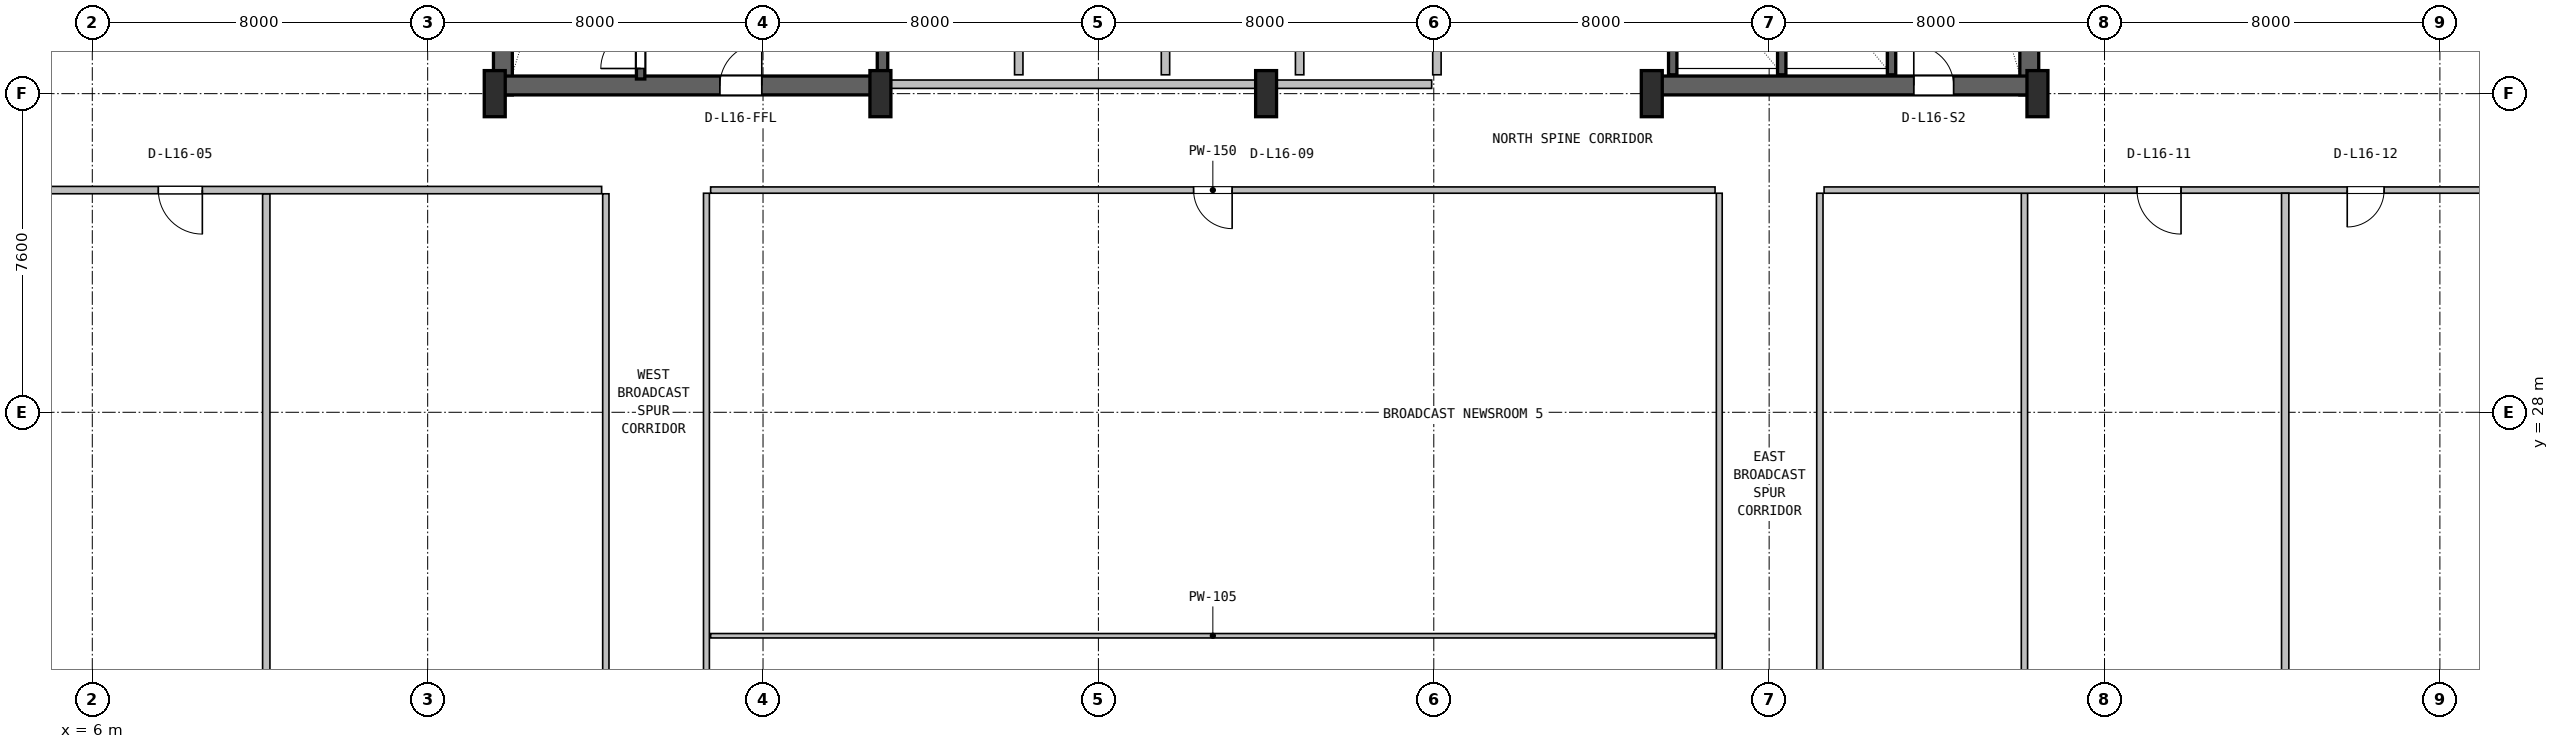
"""IFC4 building model, lengths in metres.
Left out: names, types, materials, properties, quantities, classifications, styles, units other than length and angle.
Written with IfcOpenShell. Run it as: python <this file> out.ifc"""

import sys

from ifc_helpers import new_model, si_unit, direction, frame, frame_2d, origin, origin_2d, place, context, subcontext, project, spatial, rectangle, i_section, extrude, source, transform, mapped, element, fill, save


model = new_model("IFC4")
c1 = context("Model", 3, precision=1e-05, world=origin(), true_north=direction((0.0, 1.0)))
c2 = subcontext(c1, "Body", "Model", "MODEL_VIEW")
j1 = project(units=[si_unit("LENGTHUNIT", "METRE"), si_unit("PLANEANGLEUNIT", "RADIAN")], contexts=[c1])
p1 = place(None, origin())
s1 = spatial("IfcSite", under=j1, at=p1, CompositionType="ELEMENT")
p2 = place(p1, origin())
s2 = spatial("IfcBuilding", under=s1, at=p2, CompositionType="ELEMENT")
p3 = place(p2, frame((0.0, 0.0, 70.5)))
s3 = spatial("IfcBuildingStorey", under=s2, at=p3, CompositionType="ELEMENT", Elevation=70.5)
for number, where, z_axis, x_axis in (
    (1, (15.795, 35.57, 0.0), (0.0, 0.0, 1.0), (0.0, 1.0, 0.0)),
    (2, (52.205, 35.57, 0.0), (0.0, 0.0, 1.0), (0.0, 1.0, 0.0)),
):
    element("IfcWall", number, at=place(p3, frame(where, z_axis=z_axis, x_axis=x_axis)), inside=s3, PredefinedType="SHEAR", context=c2, shape_type="SweptSolid", body=[
        extrude(rectangle(XDim=11.23, YDim=0.45, at=frame_2d((5.615, 0.0))), origin(), (0.0, 0.0, 1.0), 3.65),
    ])
p4 = place(p3, frame((15.57, 35.795, 0.0), z_axis=(0.0, 0.0, 1.0), x_axis=(1.0, 0.0, 0.0)))
e3 = element("IfcWall", 3, at=p4, inside=s3, PredefinedType="SHEAR", context=c2, shape_type="SweptSolid", body=[
    extrude(rectangle(XDim=9.23, YDim=0.45, at=frame_2d((4.615, 0.0))), origin(), (0.0, 0.0, 1.0), 3.65),
])
p5 = place(p4, frame((5.4, 0.0, 0.0)))
e4 = element("IfcOpeningElement", 4, at=p5, cuts=e3, PredefinedType="OPENING", context=c2, shape_type="SweptSolid", body=[
    extrude(rectangle(XDim=1.0, YDim=2.1, at=frame_2d((0.5, 1.05))), frame((0.0, 0.235, 0.0), z_axis=(0.0, -1.0, 0.0), x_axis=(1.0, 0.0, 0.0)), (0.0, 0.0, 1.0), 0.47),
])
p6 = place(p3, frame((43.2, 35.795, 0.0), z_axis=(0.0, 0.0, 1.0), x_axis=(1.0, 0.0, 0.0)))
e5 = element("IfcWall", 5, at=p6, inside=s3, PredefinedType="SHEAR", context=c2, shape_type="SweptSolid", body=[
    extrude(rectangle(XDim=9.23, YDim=0.45, at=frame_2d((4.615, 0.0))), origin(), (0.0, 0.0, 1.0), 3.65),
])
p7 = place(p6, frame((6.25, 0.0, 0.0)))
e6 = element("IfcOpeningElement", 6, at=p7, cuts=e5, PredefinedType="OPENING", context=c2, shape_type="SweptSolid", body=[
    extrude(rectangle(XDim=0.95, YDim=2.1, at=frame_2d((0.475, 1.05))), frame((0.0, 0.235, 0.0), z_axis=(0.0, -1.0, 0.0), x_axis=(1.0, 0.0, 0.0)), (0.0, 0.0, 1.0), 0.47),
])
m1 = source(origin(), c2, "Body", "SweptSolid", [
    extrude(i_section(OverallWidth=0.5, OverallDepth=1.1, WebThickness=0.018, FlangeThickness=0.032, FilletRadius=0.018, at=origin_2d()), origin(), (0.0, 0.0, 1.0), 3.9),
])
for number, where, z_axis, x_axis in (
    (7, (15.6, 35.6, 0.0), (0.0, 0.0, 1.0), (1.0, 0.0, 0.0)),
    (8, (24.8, 35.6, 0.0), (0.0, 0.0, 1.0), (1.0, 0.0, 0.0)),
    (9, (34.0, 35.6, 0.0), (0.0, 0.0, 1.0), (1.0, 0.0, 0.0)),
    (10, (43.2, 35.6, 0.0), (0.0, 0.0, 1.0), (1.0, 0.0, 0.0)),
    (11, (52.4, 35.6, 0.0), (0.0, 0.0, 1.0), (1.0, 0.0, 0.0)),
):
    element("IfcColumn", number, at=place(p3, frame(where, z_axis=z_axis, x_axis=x_axis)), inside=s3, PredefinedType="COLUMN", context=c2, shape_type="MappedRepresentation", body=[
        mapped(m1, transform((0.0, 0.0, 0.0), x_axis=(1.0, 0.0, 0.0), y_axis=(0.0, 1.0, 0.0), z_axis=(0.0, 0.0, 1.0), scale=1.0)),
    ])
p8 = place(p3, frame((19.08, 35.95, 0.0), z_axis=(0.0, 0.0, 1.0), x_axis=(0.0, 1.0, 0.0)))
e12 = element("IfcWall", 12, at=p8, inside=s3, PredefinedType="SHEAR", context=c2, shape_type="SweptSolid", body=[
    extrude(rectangle(XDim=9.65, YDim=0.2, at=frame_2d((4.825, 0.0))), origin(), (0.0, 0.0, 1.0), 3.65),
])
p9 = place(p8, frame((0.25, 0.0, 0.0)))
e13 = element("IfcOpeningElement", 13, at=p9, cuts=e12, PredefinedType="OPENING", context=c2, shape_type="SweptSolid", body=[
    extrude(rectangle(XDim=0.95, YDim=2.1, at=frame_2d((0.475, 1.05))), frame((0.0, 0.11, 0.0), z_axis=(0.0, -1.0, 0.0), x_axis=(1.0, 0.0, 0.0)), (0.0, 0.0, 1.0), 0.22),
])
p10 = place(p3, frame((24.85, 36.05, 0.0), z_axis=(0.0, 0.0, 1.0), x_axis=(0.0, 1.0, 0.0)))
e14 = element("IfcWall", 14, at=p10, inside=s3, PredefinedType="SHEAR", context=c2, shape_type="SweptSolid", body=[
    extrude(rectangle(XDim=10.45, YDim=0.25, at=frame_2d((5.225, 0.0))), origin(), (0.0, 0.0, 1.0), 3.65),
])
p11 = place(p3, frame((48.92, 36.05, 0.0), z_axis=(0.0, 0.0, 1.0), x_axis=(0.0, 1.0, 0.0)))
e15 = element("IfcWall", 15, at=p11, inside=s3, PredefinedType="SHEAR", context=c2, shape_type="SweptSolid", body=[
    extrude(rectangle(XDim=10.5, YDim=0.2, at=frame_2d((5.25, 0.0))), origin(), (0.0, 0.0, 1.0), 3.65),
])
for number, where, z_axis, x_axis in (
    (16, (43.7, 36.05, 0.0), (0.0, 0.0, 1.0), (0.0, 1.0, 0.0)),
    (17, (46.3, 36.05, 0.0), (0.0, 0.0, 1.0), (0.0, 1.0, 0.0)),
):
    element("IfcWall", number, at=place(p3, frame(where, z_axis=z_axis, x_axis=x_axis)), inside=s3, PredefinedType="SHEAR", context=c2, shape_type="SweptSolid", body=[
        extrude(rectangle(XDim=3.05, YDim=0.2, at=frame_2d((1.525, 0.0))), origin(), (0.0, 0.0, 1.0), 3.65),
    ])
p12 = place(p3, frame((25.0, 35.825, 0.0), z_axis=(0.0, 0.0, 1.0), x_axis=(1.0, 0.0, 0.0)))
e18 = element("IfcWall", 18, at=p12, inside=s3, PredefinedType="SOLIDWALL", context=c2, shape_type="SweptSolid", body=[
    extrude(rectangle(XDim=12.95, YDim=0.2, at=frame_2d((6.475, 0.0))), origin(), (0.0, 0.0, 1.0), 2.425),
])
for number, where, z_axis, x_axis in (
    (19, (28.1, 36.05, 0.0), (0.0, 0.0, 1.0), (0.0, 1.0, 0.0)),
    (20, (31.6, 36.05, 0.0), (0.0, 0.0, 1.0), (0.0, 1.0, 0.0)),
):
    element("IfcWall", number, at=place(p3, frame(where, z_axis=z_axis, x_axis=x_axis)), inside=s3, PredefinedType="PLUMBINGWALL", context=c2, shape_type="SweptSolid", body=[
        extrude(rectangle(XDim=3.1, YDim=0.2, at=frame_2d((1.55, 0.0))), origin(), (0.0, 0.0, 1.0), 3.63),
    ])
for number, where, z_axis, x_axis in (
    (21, (34.8, 36.05, 0.0), (0.0, 0.0, 1.0), (0.0, 1.0, 0.0)),
    (22, (38.075, 36.05, 0.0), (0.0, 0.0, 1.0), (0.0, 1.0, 0.0)),
):
    element("IfcWall", number, at=place(p3, frame(where, z_axis=z_axis, x_axis=x_axis)), inside=s3, PredefinedType="SOLIDWALL", context=c2, shape_type="SweptSolid", body=[
        extrude(rectangle(XDim=3.1, YDim=0.2, at=frame_2d((1.55, 0.0))), origin(), (0.0, 0.0, 1.0), 3.63),
    ])
p13 = place(p3, frame((10.15, 1.38, 0.0), z_axis=(0.0, 0.0, 1.0), x_axis=(0.0, 1.0, 0.0)))
e23 = element("IfcWall", 23, at=p13, inside=s3, PredefinedType="PARTITIONING", context=c2, shape_type="SweptSolid", body=[
    extrude(rectangle(XDim=31.832, YDim=0.175, at=frame_2d((15.916, 0.0))), origin(), (0.0, 0.0, 1.0), 3.208),
])
p14 = place(p3, frame((2.18, 33.3, 0.0), z_axis=(0.0, 0.0, 1.0), x_axis=(1.0, 0.0, 0.0)))
e24 = element("IfcWall", 24, at=p14, inside=s3, PredefinedType="PARTITIONING", context=c2, shape_type="SweptSolid", body=[
    extrude(rectangle(XDim=15.97, YDim=0.175, at=frame_2d((7.985, 0.0))), origin(), (0.0, 0.0, 1.0), 3.208),
])
p15 = place(p14, frame((5.395, 0.0, 0.0)))
e25 = element("IfcOpeningElement", 25, at=p15, cuts=e24, PredefinedType="OPENING", context=c2, shape_type="SweptSolid", body=[
    extrude(rectangle(XDim=1.05, YDim=2.1, at=frame_2d((0.525, 1.05))), frame((0.0, 0.098, 0.0), z_axis=(0.0, -1.0, 0.0), x_axis=(1.0, 0.0, 0.0)), (0.0, 0.0, 1.0), 0.195),
])
p16 = place(p3, frame((18.25, 1.38, 0.0), z_axis=(0.0, 0.0, 1.0), x_axis=(0.0, 1.0, 0.0)))
e26 = element("IfcWall", 26, at=p16, inside=s3, PredefinedType="PARTITIONING", context=c2, shape_type="SweptSolid", body=[
    extrude(rectangle(XDim=31.832, YDim=0.15, at=frame_2d((15.916, 0.0))), origin(), (0.0, 0.0, 1.0), 3.208),
])
p17 = place(p16, frame((16.0, 0.0, 0.0)))
e27 = element("IfcOpeningElement", 27, at=p17, cuts=e26, PredefinedType="OPENING", context=c2, shape_type="SweptSolid", body=[
    extrude(rectangle(XDim=0.88, YDim=2.06, at=frame_2d((0.44, 1.03))), frame((0.0, 0.085, 0.0), z_axis=(0.0, -1.0, 0.0), x_axis=(1.0, 0.0, 0.0)), (0.0, 0.0, 1.0), 0.17),
])
p18 = place(p3, frame((44.81, 1.38, 0.0), z_axis=(0.0, 0.0, 1.0), x_axis=(0.0, 1.0, 0.0)))
e28 = element("IfcWall", 28, at=p18, inside=s3, PredefinedType="PARTITIONING", context=c2, shape_type="SweptSolid", body=[
    extrude(rectangle(XDim=31.845, YDim=0.14, at=frame_2d((15.923, 0.0))), origin(), (0.0, 0.0, 1.0), 3.208),
])
p19 = place(p18, frame((7.0, 0.0, 0.0)))
e29 = element("IfcOpeningElement", 29, at=p19, cuts=e28, PredefinedType="OPENING", context=c2, shape_type="SweptSolid", body=[
    extrude(rectangle(XDim=1.0, YDim=2.1, at=frame_2d((0.5, 1.05))), frame((0.0, 0.08, 0.0), z_axis=(0.0, -1.0, 0.0), x_axis=(1.0, 0.0, 0.0)), (0.0, 0.0, 1.0), 0.16),
])
p20 = place(p18, frame((16.175, 0.0, 0.0)))
e30 = element("IfcOpeningElement", 30, at=p20, cuts=e28, PredefinedType="OPENING", context=c2, shape_type="SweptSolid", body=[
    extrude(rectangle(XDim=0.88, YDim=2.06, at=frame_2d((0.44, 1.03))), frame((0.0, 0.08, 0.0), z_axis=(0.0, -1.0, 0.0), x_axis=(1.0, 0.0, 0.0)), (0.0, 0.0, 1.0), 0.16),
])
p21 = place(p3, frame((20.65, 1.38, 0.0), z_axis=(0.0, 0.0, 1.0), x_axis=(0.0, 1.0, 0.0)))
e31 = element("IfcWall", 31, at=p21, inside=s3, PredefinedType="PARTITIONING", context=c2, shape_type="SweptSolid", body=[
    extrude(rectangle(XDim=31.845, YDim=0.14, at=frame_2d((15.923, 0.0))), origin(), (0.0, 0.0, 1.0), 3.208),
])
p22 = place(p3, frame((20.75, 22.67, 0.0), z_axis=(0.0, 0.0, 1.0), x_axis=(1.0, 0.0, 0.0)))
e32 = element("IfcWall", 32, at=p22, inside=s3, PredefinedType="PARTITIONING", context=c2, shape_type="SweptSolid", body=[
    extrude(rectangle(XDim=23.96, YDim=0.105, at=frame_2d((11.98, 0.0))), origin(), (0.0, 0.0, 1.0), 2.852),
])
p23 = place(p3, frame((20.75, 33.3, 0.0), z_axis=(0.0, 0.0, 1.0), x_axis=(1.0, 0.0, 0.0)))
e33 = element("IfcWall", 33, at=p23, inside=s3, PredefinedType="PARTITIONING", context=c2, shape_type="SweptSolid", body=[
    extrude(rectangle(XDim=23.96, YDim=0.15, at=frame_2d((11.98, 0.0))), origin(), (0.0, 0.0, 1.0), 2.852),
])
p24 = place(p23, frame((11.52, 0.0, 0.0)))
e34 = element("IfcOpeningElement", 34, at=p24, cuts=e33, PredefinedType="OPENING", context=c2, shape_type="SweptSolid", body=[
    extrude(rectangle(XDim=0.92, YDim=2.08, at=frame_2d((0.46, 1.04))), frame((0.0, 0.085, 0.0), z_axis=(0.0, -1.0, 0.0), x_axis=(1.0, 0.0, 0.0)), (0.0, 0.0, 1.0), 0.17),
])
p25 = place(p3, frame((52.09, 1.38, 0.0), z_axis=(0.0, 0.0, 1.0), x_axis=(0.0, 1.0, 0.0)))
e35 = element("IfcWall", 35, at=p25, inside=s3, PredefinedType="PARTITIONING", context=c2, shape_type="SweptSolid", body=[
    extrude(rectangle(XDim=31.845, YDim=0.15, at=frame_2d((15.923, 0.0))), origin(), (0.0, 0.0, 1.0), 3.208),
])
p26 = place(p3, frame((47.31, 33.3, 0.0), z_axis=(0.0, 0.0, 1.0), x_axis=(1.0, 0.0, 0.0)))
e36 = element("IfcWall", 36, at=p26, inside=s3, PredefinedType="PARTITIONING", context=c2, shape_type="SweptSolid", body=[
    extrude(rectangle(XDim=18.51, YDim=0.15, at=frame_2d((9.255, 0.0))), origin(), (0.0, 0.0, 1.0), 3.208),
])
p27 = place(p26, frame((7.465, 0.0, 0.0)))
e37 = element("IfcOpeningElement", 37, at=p27, cuts=e36, PredefinedType="OPENING", context=c2, shape_type="SweptSolid", body=[
    extrude(rectangle(XDim=1.05, YDim=2.1, at=frame_2d((0.525, 1.05))), frame((0.0, 0.085, 0.0), z_axis=(0.0, -1.0, 0.0), x_axis=(1.0, 0.0, 0.0)), (0.0, 0.0, 1.0), 0.17),
])
p28 = place(p26, frame((12.48, 0.0, 0.0)))
e38 = element("IfcOpeningElement", 38, at=p28, cuts=e36, PredefinedType="OPENING", context=c2, shape_type="SweptSolid", body=[
    extrude(rectangle(XDim=0.88, YDim=2.06, at=frame_2d((0.44, 1.03))), frame((0.0, 0.085, 0.0), z_axis=(0.0, -1.0, 0.0), x_axis=(1.0, 0.0, 0.0)), (0.0, 0.0, 1.0), 0.17),
])
p29 = place(p3, frame((47.21, 1.38, 0.0), z_axis=(0.0, 0.0, 1.0), x_axis=(0.0, 1.0, 0.0)))
e39 = element("IfcWall", 39, at=p29, inside=s3, PredefinedType="PARTITIONING", context=c2, shape_type="SweptSolid", body=[
    extrude(rectangle(XDim=31.845, YDim=0.15, at=frame_2d((15.923, 0.0))), origin(), (0.0, 0.0, 1.0), 3.208),
])
p30 = place(p29, frame((15.98, 0.0, 0.0)))
e40 = element("IfcOpeningElement", 40, at=p30, cuts=e39, PredefinedType="OPENING", context=c2, shape_type="SweptSolid", body=[
    extrude(rectangle(XDim=0.92, YDim=2.08, at=frame_2d((0.46, 1.04))), frame((0.0, 0.085, 0.0), z_axis=(0.0, -1.0, 0.0), x_axis=(1.0, 0.0, 0.0)), (0.0, 0.0, 1.0), 0.17),
])
p31 = place(p3, frame((58.31, 1.38, 0.0), z_axis=(0.0, 0.0, 1.0), x_axis=(0.0, 1.0, 0.0)))
e41 = element("IfcWall", 41, at=p31, inside=s3, PredefinedType="PARTITIONING", context=c2, shape_type="SweptSolid", body=[
    extrude(rectangle(XDim=31.845, YDim=0.175, at=frame_2d((15.923, 0.0))), origin(), (0.0, 0.0, 1.0), 3.208),
])
m2 = source(origin(), c2, "Body", "SweptSolid", [
    extrude(rectangle(XDim=0.95, YDim=2.1, at=frame_2d((0.475, 1.05))), frame((0.0, 0.025, 0.0), z_axis=(0.0, -1.0, 0.0), x_axis=(1.0, 0.0, 0.0)), (0.0, 0.0, 1.0), 0.05),
])
p32 = place(p9, origin())
e42 = element("IfcDoor", 42, at=p32, inside=s3, OperationType="SINGLE_SWING_LEFT", PredefinedType="DOOR", context=c2, shape_type="MappedRepresentation", body=[
    mapped(m2, transform((0.0, 0.0, 0.0), x_axis=(1.0, 0.0, 0.0), y_axis=(0.0, 1.0, 0.0), z_axis=(0.0, 0.0, 1.0), scale=1.0)),
])
fill(e13, e42)
m3 = source(origin(), c2, "Body", "SweptSolid", [
    extrude(rectangle(XDim=1.0, YDim=2.1, at=frame_2d((0.5, 1.05))), frame((0.0, 0.025, 0.0), z_axis=(0.0, -1.0, 0.0), x_axis=(1.0, 0.0, 0.0)), (0.0, 0.0, 1.0), 0.05),
])
p33 = place(p5, origin())
e43 = element("IfcDoor", 43, at=p33, inside=s3, OperationType="SINGLE_SWING_RIGHT", PredefinedType="DOOR", context=c2, shape_type="MappedRepresentation", body=[
    mapped(m3, transform((0.0, 0.0, 0.0), x_axis=(1.0, 0.0, 0.0), y_axis=(0.0, 1.0, 0.0), z_axis=(0.0, 0.0, 1.0), scale=1.0)),
])
fill(e4, e43)
p34 = place(p7, origin())
e44 = element("IfcDoor", 44, at=p34, inside=s3, OperationType="SINGLE_SWING_LEFT", PredefinedType="DOOR", context=c2, shape_type="MappedRepresentation", body=[
    mapped(m2, transform((0.0, 0.0, 0.0), x_axis=(1.0, 0.0, 0.0), y_axis=(0.0, 1.0, 0.0), z_axis=(0.0, 0.0, 1.0), scale=1.0)),
])
fill(e6, e44)
m4 = source(origin(), c2, "Body", "SweptSolid", [
    extrude(rectangle(XDim=1.05, YDim=2.1, at=frame_2d((0.525, 1.05))), frame((0.0, 0.025, 0.0), z_axis=(0.0, -1.0, 0.0), x_axis=(1.0, 0.0, 0.0)), (0.0, 0.0, 1.0), 0.05),
])
p35 = place(p15, frame((1.05, 0.0, 0.0), z_axis=(0.0, 0.0, 1.0), x_axis=(-1.0, 0.0, 0.0)))
e45 = element("IfcDoor", 45, at=p35, inside=s3, OperationType="SINGLE_SWING_RIGHT", PredefinedType="DOOR", context=c2, shape_type="MappedRepresentation", body=[
    mapped(m4, transform((0.0, 0.0, 0.0), x_axis=(1.0, 0.0, 0.0), y_axis=(0.0, 1.0, 0.0), z_axis=(0.0, 0.0, 1.0), scale=1.0)),
])
fill(e25, e45)
m5 = source(origin(), c2, "Body", "SweptSolid", [
    extrude(rectangle(XDim=0.92, YDim=2.08, at=frame_2d((0.46, 1.04))), frame((0.0, 0.025, 0.0), z_axis=(0.0, -1.0, 0.0), x_axis=(1.0, 0.0, 0.0)), (0.0, 0.0, 1.0), 0.05),
])
p36 = place(p24, frame((0.92, 0.0, 0.0), z_axis=(0.0, 0.0, 1.0), x_axis=(-1.0, 0.0, 0.0)))
e46 = element("IfcDoor", 46, at=p36, inside=s3, OperationType="SINGLE_SWING_RIGHT", PredefinedType="DOOR", context=c2, shape_type="MappedRepresentation", body=[
    mapped(m5, transform((0.0, 0.0, 0.0), x_axis=(1.0, 0.0, 0.0), y_axis=(0.0, 1.0, 0.0), z_axis=(0.0, 0.0, 1.0), scale=1.0)),
])
fill(e34, e46)
p37 = place(p27, frame((1.05, 0.0, 0.0), z_axis=(0.0, 0.0, 1.0), x_axis=(-1.0, 0.0, 0.0)))
e47 = element("IfcDoor", 47, at=p37, inside=s3, OperationType="SINGLE_SWING_RIGHT", PredefinedType="DOOR", context=c2, shape_type="MappedRepresentation", body=[
    mapped(m4, transform((0.0, 0.0, 0.0), x_axis=(1.0, 0.0, 0.0), y_axis=(0.0, 1.0, 0.0), z_axis=(0.0, 0.0, 1.0), scale=1.0)),
])
fill(e37, e47)
m6 = source(origin(), c2, "Body", "SweptSolid", [
    extrude(rectangle(XDim=0.88, YDim=2.06, at=frame_2d((0.44, 1.03))), frame((0.0, 0.025, 0.0), z_axis=(0.0, -1.0, 0.0), x_axis=(1.0, 0.0, 0.0)), (0.0, 0.0, 1.0), 0.05),
])
p38 = place(p28, frame((0.88, 0.0, 0.0), z_axis=(0.0, 0.0, 1.0), x_axis=(-1.0, 0.0, 0.0)))
e48 = element("IfcDoor", 48, at=p38, inside=s3, OperationType="SINGLE_SWING_LEFT", PredefinedType="DOOR", context=c2, shape_type="MappedRepresentation", body=[
    mapped(m6, transform((0.0, 0.0, 0.0), x_axis=(1.0, 0.0, 0.0), y_axis=(0.0, 1.0, 0.0), z_axis=(0.0, 0.0, 1.0), scale=1.0)),
])
fill(e38, e48)
save(model, sys.argv[1])
